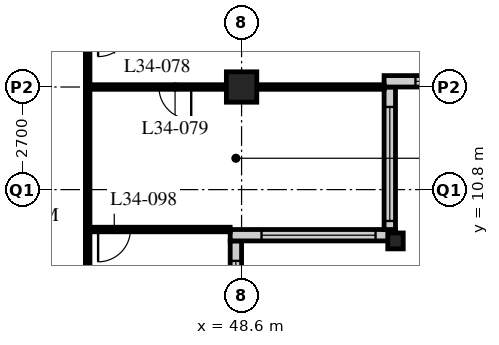
"""IFC4 building model, lengths in metres.
Left out: names, types, materials, properties, quantities, classifications, styles, units other than length and angle.
Written with IfcOpenShell. Run it as: python <this file> out.ifc"""

import sys

from ifc_helpers import new_model, si_unit, direction, frame, frame_2d, origin, origin_2d, place, context, subcontext, project, spatial, rectangle, hollow_rectangle, i_section, extrude, element, fill, save


model = new_model("IFC4")
c1 = context("Model", 3, precision=1e-05, world=origin(), true_north=direction((0.0, 1.0)))
c2 = subcontext(c1, "Body", "Model", "MODEL_VIEW")
j1 = project(units=[si_unit("LENGTHUNIT", "METRE"), si_unit("PLANEANGLEUNIT", "RADIAN")], contexts=[c1])
p1 = place(None, origin())
s1 = spatial("IfcSite", under=j1, at=p1, CompositionType="ELEMENT")
p2 = place(p1, origin())
s2 = spatial("IfcBuilding", under=s1, at=p2, CompositionType="ELEMENT")
p3 = place(p2, frame((0.0, 0.0, 134.0)))
s3 = spatial("IfcBuildingStorey", under=s2, at=p3, CompositionType="ELEMENT", Elevation=134.0)
p4 = place(p3, frame((48.6, 13.5, 0.0), z_axis=(0.0, 0.0, 1.0), x_axis=(1.0, 0.0, 0.0)))
e1 = element("IfcColumn", 1, at=p4, inside=s3, PredefinedType="COLUMN", context=c2, shape_type="SweptSolid", body=[
    extrude(hollow_rectangle(XDim=0.8, YDim=0.8, WallThickness=0.08, at=origin_2d()), origin(), (0.0, 0.0, 1.0), 3.4),
])
p5 = place(p3, frame((52.65, 9.45, 0.0), z_axis=(0.0, 0.0, 1.0), x_axis=(1.0, 0.0, 0.0)))
e2 = element("IfcColumn", 2, at=p5, inside=s3, PredefinedType="COLUMN", context=c2, shape_type="SweptSolid", body=[
    extrude(i_section(OverallWidth=0.407, OverallDepth=0.419, WebThickness=0.031, FlangeThickness=0.049, FilletRadius=0.015, at=origin_2d()), origin(), (0.0, 0.0, 1.0), 3.4),
])
p6 = place(p3, frame((48.45, 5.7, 0.0), z_axis=(0.0, 0.0, 1.0), x_axis=(0.0, 1.0, 0.0)))
e3 = element("IfcWall", 3, at=p6, inside=s3, PredefinedType="SOLIDWALL", context=c2, shape_type="SweptSolid", body=[
    extrude(rectangle(XDim=3.75, YDim=0.3, at=frame_2d((1.875, 0.0))), origin(), (0.0, 0.0, 1.0), 3.19),
])
p7 = place(p6, frame((0.225, 0.0, 0.9)))
e4 = element("IfcOpeningElement", 4, at=p7, cuts=e3, PredefinedType="OPENING", context=c2, shape_type="SweptSolid", body=[
    extrude(rectangle(XDim=3.0, YDim=1.5, at=frame_2d((1.5, 0.75))), frame((0.0, 0.16, 0.0), z_axis=(0.0, -1.0, 0.0), x_axis=(1.0, 0.0, 0.0)), (0.0, 0.0, 1.0), 0.32),
])
p8 = place(p3, frame((48.3, 9.6, 0.0), z_axis=(0.0, 0.0, 1.0), x_axis=(1.0, 0.0, 0.0)))
e5 = element("IfcWall", 5, at=p8, inside=s3, PredefinedType="SOLIDWALL", context=c2, shape_type="SweptSolid", body=[
    extrude(rectangle(XDim=4.35, YDim=0.3, at=frame_2d((2.175, 0.0))), origin(), (0.0, 0.0, 1.0), 3.19),
])
p9 = place(p8, frame((0.825, 0.0, 0.9)))
e6 = element("IfcOpeningElement", 6, at=p9, cuts=e5, PredefinedType="OPENING", context=c2, shape_type="SweptSolid", body=[
    extrude(rectangle(XDim=3.0, YDim=1.5, at=frame_2d((1.5, 0.75))), frame((0.0, 0.16, 0.0), z_axis=(0.0, -1.0, 0.0), x_axis=(1.0, 0.0, 0.0)), (0.0, 0.0, 1.0), 0.32),
])
p10 = place(p3, frame((52.5, 9.75, 0.0), z_axis=(0.0, 0.0, 1.0), x_axis=(0.0, 1.0, 0.0)))
e7 = element("IfcWall", 7, at=p10, inside=s3, PredefinedType="SOLIDWALL", context=c2, shape_type="SweptSolid", body=[
    extrude(rectangle(XDim=3.75, YDim=0.3, at=frame_2d((1.875, 0.0))), origin(), (0.0, 0.0, 1.0), 3.19),
])
p11 = place(p10, frame((0.225, 0.0, 0.9)))
e8 = element("IfcOpeningElement", 8, at=p11, cuts=e7, PredefinedType="OPENING", context=c2, shape_type="SweptSolid", body=[
    extrude(rectangle(XDim=3.0, YDim=1.5, at=frame_2d((1.5, 0.75))), frame((0.0, 0.16, 0.0), z_axis=(0.0, -1.0, 0.0), x_axis=(1.0, 0.0, 0.0)), (0.0, 0.0, 1.0), 0.32),
])
p12 = place(p3, frame((52.35, 13.65, 0.0), z_axis=(0.0, 0.0, 1.0), x_axis=(1.0, 0.0, 0.0)))
e9 = element("IfcWall", 9, at=p12, inside=s3, PredefinedType="SOLIDWALL", context=c2, shape_type="SweptSolid", body=[
    extrude(rectangle(XDim=4.35, YDim=0.3, at=frame_2d((2.175, 0.0))), origin(), (0.0, 0.0, 1.0), 3.19),
])
p13 = place(p12, frame((0.825, 0.0, 0.9)))
e10 = element("IfcOpeningElement", 10, at=p13, cuts=e9, PredefinedType="OPENING", context=c2, shape_type="SweptSolid", body=[
    extrude(rectangle(XDim=3.0, YDim=1.5, at=frame_2d((1.5, 0.75))), frame((0.0, 0.16, 0.0), z_axis=(0.0, -1.0, 0.0), x_axis=(1.0, 0.0, 0.0)), (0.0, 0.0, 1.0), 0.32),
])
p14 = place(p3, frame((44.55, 15.15, 0.0), z_axis=(0.0, 0.0, 1.0), x_axis=(0.0, -1.0, 0.0)))
e11 = element("IfcWall", 11, at=p14, inside=s3, PredefinedType="PARTITIONING", context=c2, shape_type="SweptSolid", body=[
    extrude(rectangle(XDim=9.45, YDim=0.12, at=frame_2d((4.725, 0.0))), origin(), (0.0, 0.0, 1.0), 3.19),
])
p15 = place(p3, frame((44.55, 13.5, 0.0), z_axis=(0.0, 0.0, 1.0), x_axis=(1.0, 0.0, 0.0)))
e12 = element("IfcWall", 12, at=p15, inside=s3, PredefinedType="PARTITIONING", context=c2, shape_type="SweptSolid", body=[
    extrude(rectangle(XDim=7.8, YDim=0.12, at=frame_2d((3.9, 0.0))), origin(), (0.0, 0.0, 1.0), 2.578),
])
p16 = place(p15, frame((1.875, 0.0, 0.0)))
e13 = element("IfcOpeningElement", 13, at=p16, cuts=e12, PredefinedType="OPENING", context=c2, shape_type="SweptSolid", body=[
    extrude(rectangle(XDim=0.85, YDim=2.1, at=frame_2d((0.425, 1.05))), frame((0.0, 0.07, 0.0), z_axis=(0.0, -1.0, 0.0), x_axis=(1.0, 0.0, 0.0)), (0.0, 0.0, 1.0), 0.14),
])
p17 = place(p3, frame((44.55, 9.75, 0.0), z_axis=(0.0, 0.0, 1.0), x_axis=(1.0, 0.0, 0.0)))
e14 = element("IfcWall", 14, at=p17, inside=s3, PredefinedType="PARTITIONING", context=c2, shape_type="SweptSolid", body=[
    extrude(rectangle(XDim=3.75, YDim=0.12, at=frame_2d((1.875, 0.0))), origin(), (0.0, 0.0, 1.0), 3.19),
])
p18 = place(p17, frame((0.275, 0.0, 0.0)))
e15 = element("IfcOpeningElement", 15, at=p18, cuts=e14, PredefinedType="OPENING", context=c2, shape_type="SweptSolid", body=[
    extrude(rectangle(XDim=0.85, YDim=2.1, at=frame_2d((0.425, 1.05))), frame((0.0, 0.07, 0.0), z_axis=(0.0, -1.0, 0.0), x_axis=(1.0, 0.0, 0.0)), (0.0, 0.0, 1.0), 0.14),
])
p19 = place(p7, origin())
e16 = element("IfcWindow", 16, at=p19, inside=s3, PartitioningType="SINGLE_PANEL", PredefinedType="WINDOW", context=c2, shape_type="SweptSolid", body=[
    extrude(rectangle(XDim=3.0, YDim=1.5, at=frame_2d((1.5, 0.75))), frame((0.0, 0.03, 0.0), z_axis=(0.0, -1.0, 0.0), x_axis=(1.0, 0.0, 0.0)), (0.0, 0.0, 1.0), 0.06),
])
fill(e4, e16)
p20 = place(p9, origin())
e17 = element("IfcWindow", 17, at=p20, inside=s3, PartitioningType="SINGLE_PANEL", PredefinedType="WINDOW", context=c2, shape_type="SweptSolid", body=[
    extrude(rectangle(XDim=3.0, YDim=1.5, at=frame_2d((1.5, 0.75))), frame((0.0, 0.03, 0.0), z_axis=(0.0, -1.0, 0.0), x_axis=(1.0, 0.0, 0.0)), (0.0, 0.0, 1.0), 0.06),
])
fill(e6, e17)
p21 = place(p11, origin())
e18 = element("IfcWindow", 18, at=p21, inside=s3, PartitioningType="SINGLE_PANEL", PredefinedType="WINDOW", context=c2, shape_type="SweptSolid", body=[
    extrude(rectangle(XDim=3.0, YDim=1.5, at=frame_2d((1.5, 0.75))), frame((0.0, 0.03, 0.0), z_axis=(0.0, -1.0, 0.0), x_axis=(1.0, 0.0, 0.0)), (0.0, 0.0, 1.0), 0.06),
])
fill(e8, e18)
p22 = place(p13, origin())
e19 = element("IfcWindow", 19, at=p22, inside=s3, PartitioningType="SINGLE_PANEL", PredefinedType="WINDOW", context=c2, shape_type="SweptSolid", body=[
    extrude(rectangle(XDim=3.0, YDim=1.5, at=frame_2d((1.5, 0.75))), frame((0.0, 0.03, 0.0), z_axis=(0.0, -1.0, 0.0), x_axis=(1.0, 0.0, 0.0)), (0.0, 0.0, 1.0), 0.06),
])
fill(e10, e19)
p23 = place(p16, origin())
e20 = element("IfcDoor", 20, at=p23, inside=s3, OperationType="SINGLE_SWING_LEFT", PredefinedType="DOOR", context=c2, shape_type="SweptSolid", body=[
    extrude(rectangle(XDim=0.85, YDim=2.1, at=frame_2d((0.425, 1.05))), frame((0.0, 0.025, 0.0), z_axis=(0.0, -1.0, 0.0), x_axis=(1.0, 0.0, 0.0)), (0.0, 0.0, 1.0), 0.05),
])
fill(e13, e20)
p24 = place(p18, origin())
e21 = element("IfcDoor", 21, at=p24, inside=s3, OperationType="SINGLE_SWING_RIGHT", PredefinedType="DOOR", context=c2, shape_type="SweptSolid", body=[
    extrude(rectangle(XDim=0.85, YDim=2.1, at=frame_2d((0.425, 1.05))), frame((0.0, 0.025, 0.0), z_axis=(0.0, -1.0, 0.0), x_axis=(1.0, 0.0, 0.0)), (0.0, 0.0, 1.0), 0.05),
])
fill(e15, e21)
save(model, sys.argv[1])
